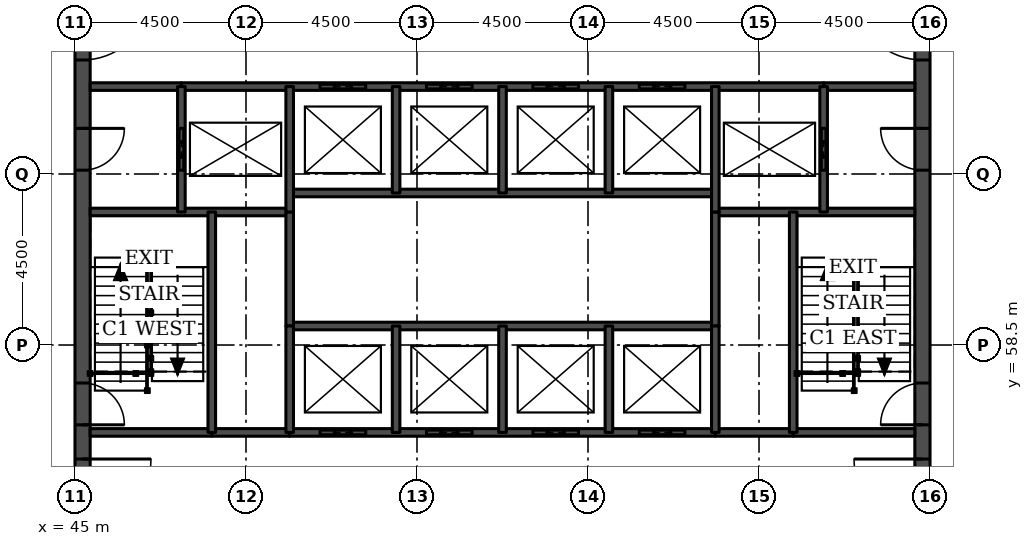
"""IFC4 building model, lengths in metres.
Left out: names, types, materials, properties, quantities, classifications, styles, units other than length and angle.
Written with IfcOpenShell. Run it as: python <this file> out.ifc"""

import sys

from ifc_helpers import new_model, si_unit, direction, frame, frame_2d, origin, place, context, subcontext, project, spatial, rectangle, extrude, element, fill, save


model = new_model("IFC4")
c1 = context("Model", 3, precision=1e-05, world=origin(), true_north=direction((0.0, 1.0)))
c2 = subcontext(c1, "Body", "Model", "MODEL_VIEW")
j1 = project(units=[si_unit("LENGTHUNIT", "METRE"), si_unit("PLANEANGLEUNIT", "RADIAN")], contexts=[c1])
p1 = place(None, origin())
s1 = spatial("IfcSite", under=j1, at=p1, CompositionType="ELEMENT")
p2 = place(p1, origin())
s2 = spatial("IfcBuilding", under=s1, at=p2, CompositionType="ELEMENT")
p3 = place(p2, frame((0.0, 0.0, 252.6)))
s3 = spatial("IfcBuildingStorey", under=s2, at=p3, CompositionType="ELEMENT", Elevation=252.6)
p4 = place(p3, frame((45.2, 49.5, 0.0), z_axis=(0.0, 0.0, 1.0), x_axis=(0.0, 1.0, 0.0)))
e1 = element("IfcWall", 1, at=p4, inside=s3, PredefinedType="SHEAR", context=c2, shape_type="SweptSolid", body=[
    extrude(rectangle(XDim=22.5, YDim=0.4, at=frame_2d((11.25, 0.0))), origin(), (0.0, 0.0, 1.0), 3.7),
])
p5 = place(p4, frame((4.2, 0.0, 0.0)))
e2 = element("IfcOpeningElement", 2, at=p5, cuts=e1, PredefinedType="OPENING", context=c2, shape_type="SweptSolid", body=[
    extrude(rectangle(XDim=1.8, YDim=2.1, at=frame_2d((0.9, 1.05))), frame((0.0, 0.21, 0.0), z_axis=(0.0, -1.0, 0.0), x_axis=(1.0, 0.0, 0.0)), (0.0, 0.0, 1.0), 0.42),
])
p6 = place(p4, frame((6.9, 0.0, 0.0)))
e3 = element("IfcOpeningElement", 3, at=p6, cuts=e1, PredefinedType="OPENING", context=c2, shape_type="SweptSolid", body=[
    extrude(rectangle(XDim=1.1, YDim=2.1, at=frame_2d((0.55, 1.05))), frame((0.0, 0.21, 0.0), z_axis=(0.0, -1.0, 0.0), x_axis=(1.0, 0.0, 0.0)), (0.0, 0.0, 1.0), 0.42),
])
p7 = place(p4, frame((13.6, 0.0, 0.0)))
e4 = element("IfcOpeningElement", 4, at=p7, cuts=e1, PredefinedType="OPENING", context=c2, shape_type="SweptSolid", body=[
    extrude(rectangle(XDim=1.1, YDim=2.1, at=frame_2d((0.55, 1.05))), frame((0.0, 0.21, 0.0), z_axis=(0.0, -1.0, 0.0), x_axis=(1.0, 0.0, 0.0)), (0.0, 0.0, 1.0), 0.42),
])
p8 = place(p4, frame((16.5, 0.0, 0.0)))
e5 = element("IfcOpeningElement", 5, at=p8, cuts=e1, PredefinedType="OPENING", context=c2, shape_type="SweptSolid", body=[
    extrude(rectangle(XDim=1.8, YDim=2.1, at=frame_2d((0.9, 1.05))), frame((0.0, 0.21, 0.0), z_axis=(0.0, -1.0, 0.0), x_axis=(1.0, 0.0, 0.0)), (0.0, 0.0, 1.0), 0.42),
])
p9 = place(p3, frame((67.3, 49.5, 0.0), z_axis=(0.0, 0.0, 1.0), x_axis=(0.0, 1.0, 0.0)))
e6 = element("IfcWall", 6, at=p9, inside=s3, PredefinedType="SHEAR", context=c2, shape_type="SweptSolid", body=[
    extrude(rectangle(XDim=22.5, YDim=0.4, at=frame_2d((11.25, 0.0))), origin(), (0.0, 0.0, 1.0), 3.7),
])
p10 = place(p9, frame((4.2, 0.0, 0.0)))
e7 = element("IfcOpeningElement", 7, at=p10, cuts=e6, PredefinedType="OPENING", context=c2, shape_type="SweptSolid", body=[
    extrude(rectangle(XDim=1.8, YDim=2.1, at=frame_2d((0.9, 1.05))), frame((0.0, 0.21, 0.0), z_axis=(0.0, -1.0, 0.0), x_axis=(1.0, 0.0, 0.0)), (0.0, 0.0, 1.0), 0.42),
])
p11 = place(p9, frame((6.9, 0.0, 0.0)))
e8 = element("IfcOpeningElement", 8, at=p11, cuts=e6, PredefinedType="OPENING", context=c2, shape_type="SweptSolid", body=[
    extrude(rectangle(XDim=1.1, YDim=2.1, at=frame_2d((0.55, 1.05))), frame((0.0, 0.21, 0.0), z_axis=(0.0, -1.0, 0.0), x_axis=(1.0, 0.0, 0.0)), (0.0, 0.0, 1.0), 0.42),
])
p12 = place(p9, frame((13.6, 0.0, 0.0)))
e9 = element("IfcOpeningElement", 9, at=p12, cuts=e6, PredefinedType="OPENING", context=c2, shape_type="SweptSolid", body=[
    extrude(rectangle(XDim=1.1, YDim=2.1, at=frame_2d((0.55, 1.05))), frame((0.0, 0.21, 0.0), z_axis=(0.0, -1.0, 0.0), x_axis=(1.0, 0.0, 0.0)), (0.0, 0.0, 1.0), 0.42),
])
p13 = place(p9, frame((16.5, 0.0, 0.0)))
e10 = element("IfcOpeningElement", 10, at=p13, cuts=e6, PredefinedType="OPENING", context=c2, shape_type="SweptSolid", body=[
    extrude(rectangle(XDim=1.8, YDim=2.1, at=frame_2d((0.9, 1.05))), frame((0.0, 0.21, 0.0), z_axis=(0.0, -1.0, 0.0), x_axis=(1.0, 0.0, 0.0)), (0.0, 0.0, 1.0), 0.42),
])
for number, where, z_axis, x_axis in (
    (11, (48.6, 56.2, 0.0), (0.0, 0.0, 1.0), (1.0, 0.0, 0.0)),
    (12, (61.85, 56.2, 0.0), (0.0, 0.0, 1.0), (1.0, 0.0, 0.0)),
):
    element("IfcWall", number, at=place(p3, frame(where, z_axis=z_axis, x_axis=x_axis)), inside=s3, PredefinedType="SOLIDWALL", context=c2, shape_type="SweptSolid", body=[
        extrude(rectangle(XDim=2.05, YDim=0.2, at=frame_2d((1.025, 0.0))), origin(), (0.0, 0.0, 1.0), 3.55),
    ])
p14 = place(p3, frame((45.4, 56.2, 0.0), z_axis=(0.0, 0.0, 1.0), x_axis=(1.0, 0.0, 0.0)))
e13 = element("IfcWall", 13, at=p14, inside=s3, PredefinedType="SOLIDWALL", context=c2, shape_type="SweptSolid", body=[
    extrude(rectangle(XDim=3.2, YDim=0.2, at=frame_2d((1.6, 0.0))), origin(), (0.0, 0.0, 1.0), 3.55),
])
p15 = place(p3, frame((50.65, 56.2, 0.0), z_axis=(0.0, 0.0, 1.0), x_axis=(1.0, 0.0, 0.0)))
e14 = element("IfcWall", 14, at=p15, inside=s3, PredefinedType="SOLIDWALL", context=c2, shape_type="SweptSolid", body=[
    extrude(rectangle(XDim=11.2, YDim=0.2, at=frame_2d((5.6, 0.0))), origin(), (0.0, 0.0, 1.0), 3.55),
])
p16 = place(p15, frame((0.8, 0.0, 0.0)))
e15 = element("IfcOpeningElement", 15, at=p16, cuts=e14, PredefinedType="OPENING", context=c2, shape_type="SweptSolid", body=[
    extrude(rectangle(XDim=1.2, YDim=2.1, at=frame_2d((0.6, 1.05))), frame((0.0, 0.11, 0.0), z_axis=(0.0, -1.0, 0.0), x_axis=(1.0, 0.0, 0.0)), (0.0, 0.0, 1.0), 0.22),
])
p17 = place(p15, frame((3.6, 0.0, 0.0)))
e16 = element("IfcOpeningElement", 16, at=p17, cuts=e14, PredefinedType="OPENING", context=c2, shape_type="SweptSolid", body=[
    extrude(rectangle(XDim=1.2, YDim=2.1, at=frame_2d((0.6, 1.05))), frame((0.0, 0.11, 0.0), z_axis=(0.0, -1.0, 0.0), x_axis=(1.0, 0.0, 0.0)), (0.0, 0.0, 1.0), 0.22),
])
p18 = place(p15, frame((6.4, 0.0, 0.0)))
e17 = element("IfcOpeningElement", 17, at=p18, cuts=e14, PredefinedType="OPENING", context=c2, shape_type="SweptSolid", body=[
    extrude(rectangle(XDim=1.2, YDim=2.1, at=frame_2d((0.6, 1.05))), frame((0.0, 0.11, 0.0), z_axis=(0.0, -1.0, 0.0), x_axis=(1.0, 0.0, 0.0)), (0.0, 0.0, 1.0), 0.22),
])
p19 = place(p15, frame((9.2, 0.0, 0.0)))
e18 = element("IfcOpeningElement", 18, at=p19, cuts=e14, PredefinedType="OPENING", context=c2, shape_type="SweptSolid", body=[
    extrude(rectangle(XDim=1.2, YDim=2.1, at=frame_2d((0.6, 1.05))), frame((0.0, 0.11, 0.0), z_axis=(0.0, -1.0, 0.0), x_axis=(1.0, 0.0, 0.0)), (0.0, 0.0, 1.0), 0.22),
])
p20 = place(p3, frame((63.9, 56.2, 0.0), z_axis=(0.0, 0.0, 1.0), x_axis=(1.0, 0.0, 0.0)))
e19 = element("IfcWall", 19, at=p20, inside=s3, PredefinedType="SOLIDWALL", context=c2, shape_type="SweptSolid", body=[
    extrude(rectangle(XDim=3.2, YDim=0.2, at=frame_2d((1.6, 0.0))), origin(), (0.0, 0.0, 1.0), 3.55),
])
p21 = place(p3, frame((50.65, 59.0, 0.0), z_axis=(0.0, 0.0, 1.0), x_axis=(1.0, 0.0, 0.0)))
e20 = element("IfcWall", 20, at=p21, inside=s3, PredefinedType="SOLIDWALL", context=c2, shape_type="SweptSolid", body=[
    extrude(rectangle(XDim=11.2, YDim=0.2, at=frame_2d((5.6, 0.0))), origin(), (0.0, 0.0, 1.0), 3.7),
])
for number, where, z_axis, x_axis in (
    (21, (45.4, 62.0, 0.0), (0.0, 0.0, 1.0), (1.0, 0.0, 0.0)),
    (22, (61.85, 62.0, 0.0), (0.0, 0.0, 1.0), (1.0, 0.0, 0.0)),
):
    element("IfcWall", number, at=place(p3, frame(where, z_axis=z_axis, x_axis=x_axis)), inside=s3, PredefinedType="SOLIDWALL", context=c2, shape_type="SweptSolid", body=[
        extrude(rectangle(XDim=5.25, YDim=0.2, at=frame_2d((2.625, 0.0))), origin(), (0.0, 0.0, 1.0), 3.55),
    ])
p22 = place(p3, frame((50.65, 62.5, 0.0), z_axis=(0.0, 0.0, 1.0), x_axis=(1.0, 0.0, 0.0)))
e23 = element("IfcWall", 23, at=p22, inside=s3, PredefinedType="SOLIDWALL", context=c2, shape_type="SweptSolid", body=[
    extrude(rectangle(XDim=11.2, YDim=0.2, at=frame_2d((5.6, 0.0))), origin(), (0.0, 0.0, 1.0), 3.7),
])
for number, where, z_axis, x_axis in (
    (24, (45.4, 65.3, 0.0), (0.0, 0.0, 1.0), (1.0, 0.0, 0.0)),
    (25, (64.7, 65.3, 0.0), (0.0, 0.0, 1.0), (1.0, 0.0, 0.0)),
):
    element("IfcWall", number, at=place(p3, frame(where, z_axis=z_axis, x_axis=x_axis)), inside=s3, PredefinedType="SOLIDWALL", context=c2, shape_type="SweptSolid", body=[
        extrude(rectangle(XDim=2.4, YDim=0.2, at=frame_2d((1.2, 0.0))), origin(), (0.0, 0.0, 1.0), 3.55),
    ])
p23 = place(p3, frame((47.8, 65.3, 0.0), z_axis=(0.0, 0.0, 1.0), x_axis=(1.0, 0.0, 0.0)))
e26 = element("IfcWall", 26, at=p23, inside=s3, PredefinedType="SOLIDWALL", context=c2, shape_type="SweptSolid", body=[
    extrude(rectangle(XDim=16.9, YDim=0.2, at=frame_2d((8.45, 0.0))), origin(), (0.0, 0.0, 1.0), 3.55),
])
p24 = place(p23, frame((3.65, 0.0, 0.0)))
e27 = element("IfcOpeningElement", 27, at=p24, cuts=e26, PredefinedType="OPENING", context=c2, shape_type="SweptSolid", body=[
    extrude(rectangle(XDim=1.2, YDim=2.1, at=frame_2d((0.6, 1.05))), frame((0.0, 0.11, 0.0), z_axis=(0.0, -1.0, 0.0), x_axis=(1.0, 0.0, 0.0)), (0.0, 0.0, 1.0), 0.22),
])
p25 = place(p23, frame((6.45, 0.0, 0.0)))
e28 = element("IfcOpeningElement", 28, at=p25, cuts=e26, PredefinedType="OPENING", context=c2, shape_type="SweptSolid", body=[
    extrude(rectangle(XDim=1.2, YDim=2.1, at=frame_2d((0.6, 1.05))), frame((0.0, 0.11, 0.0), z_axis=(0.0, -1.0, 0.0), x_axis=(1.0, 0.0, 0.0)), (0.0, 0.0, 1.0), 0.22),
])
p26 = place(p23, frame((9.25, 0.0, 0.0)))
e29 = element("IfcOpeningElement", 29, at=p26, cuts=e26, PredefinedType="OPENING", context=c2, shape_type="SweptSolid", body=[
    extrude(rectangle(XDim=1.2, YDim=2.1, at=frame_2d((0.6, 1.05))), frame((0.0, 0.11, 0.0), z_axis=(0.0, -1.0, 0.0), x_axis=(1.0, 0.0, 0.0)), (0.0, 0.0, 1.0), 0.22),
])
p27 = place(p23, frame((12.05, 0.0, 0.0)))
e30 = element("IfcOpeningElement", 30, at=p27, cuts=e26, PredefinedType="OPENING", context=c2, shape_type="SweptSolid", body=[
    extrude(rectangle(XDim=1.2, YDim=2.1, at=frame_2d((0.6, 1.05))), frame((0.0, 0.11, 0.0), z_axis=(0.0, -1.0, 0.0), x_axis=(1.0, 0.0, 0.0)), (0.0, 0.0, 1.0), 0.22),
])
p28 = place(p3, frame((47.8, 62.0, 0.0), z_axis=(0.0, 0.0, 1.0), x_axis=(0.0, 1.0, 0.0)))
e31 = element("IfcWall", 31, at=p28, inside=s3, PredefinedType="SOLIDWALL", context=c2, shape_type="SweptSolid", body=[
    extrude(rectangle(XDim=3.3, YDim=0.2, at=frame_2d((1.65, 0.0))), origin(), (0.0, 0.0, 1.0), 3.55),
])
p29 = place(p28, frame((1.1, 0.0, 0.0)))
e32 = element("IfcOpeningElement", 32, at=p29, cuts=e31, PredefinedType="OPENING", context=c2, shape_type="SweptSolid", body=[
    extrude(rectangle(XDim=1.1, YDim=2.1, at=frame_2d((0.55, 1.05))), frame((0.0, 0.11, 0.0), z_axis=(0.0, -1.0, 0.0), x_axis=(1.0, 0.0, 0.0)), (0.0, 0.0, 1.0), 0.22),
])
p30 = place(p3, frame((48.6, 56.2, 0.0), z_axis=(0.0, 0.0, 1.0), x_axis=(0.0, 1.0, 0.0)))
e33 = element("IfcWall", 33, at=p30, inside=s3, PredefinedType="SOLIDWALL", context=c2, shape_type="SweptSolid", body=[
    extrude(rectangle(XDim=5.8, YDim=0.2, at=frame_2d((2.9, 0.0))), origin(), (0.0, 0.0, 1.0), 3.55),
])
p31 = place(p3, frame((50.65, 59.0, 0.0), z_axis=(0.0, 0.0, 1.0), x_axis=(0.0, 1.0, 0.0)))
e34 = element("IfcWall", 34, at=p31, inside=s3, PredefinedType="SOLIDWALL", context=c2, shape_type="SweptSolid", body=[
    extrude(rectangle(XDim=3.0, YDim=0.2, at=frame_2d((1.5, 0.0))), origin(), (0.0, 0.0, 1.0), 3.7),
])
p32 = place(p3, frame((50.65, 56.2, 0.0), z_axis=(0.0, 0.0, 1.0), x_axis=(0.0, 1.0, 0.0)))
e35 = element("IfcWall", 35, at=p32, inside=s3, PredefinedType="SOLIDWALL", context=c2, shape_type="SweptSolid", body=[
    extrude(rectangle(XDim=2.8, YDim=0.2, at=frame_2d((1.4, 0.0))), origin(), (0.0, 0.0, 1.0), 3.55),
])
p33 = place(p3, frame((50.65, 62.0, 0.0), z_axis=(0.0, 0.0, 1.0), x_axis=(0.0, 1.0, 0.0)))
e36 = element("IfcWall", 36, at=p33, inside=s3, PredefinedType="SOLIDWALL", context=c2, shape_type="SweptSolid", body=[
    extrude(rectangle(XDim=3.3, YDim=0.2, at=frame_2d((1.65, 0.0))), origin(), (0.0, 0.0, 1.0), 3.55),
])
for number, where, z_axis, x_axis in (
    (37, (53.45, 56.2, 0.0), (0.0, 0.0, 1.0), (0.0, 1.0, 0.0)),
    (38, (53.45, 62.5, 0.0), (0.0, 0.0, 1.0), (0.0, 1.0, 0.0)),
    (39, (56.25, 56.2, 0.0), (0.0, 0.0, 1.0), (0.0, 1.0, 0.0)),
    (40, (56.25, 62.5, 0.0), (0.0, 0.0, 1.0), (0.0, 1.0, 0.0)),
    (41, (59.05, 56.2, 0.0), (0.0, 0.0, 1.0), (0.0, 1.0, 0.0)),
    (42, (59.05, 62.5, 0.0), (0.0, 0.0, 1.0), (0.0, 1.0, 0.0)),
):
    element("IfcWall", number, at=place(p3, frame(where, z_axis=z_axis, x_axis=x_axis)), inside=s3, PredefinedType="SOLIDWALL", context=c2, shape_type="SweptSolid", body=[
        extrude(rectangle(XDim=2.8, YDim=0.2, at=frame_2d((1.4, 0.0))), origin(), (0.0, 0.0, 1.0), 3.55),
    ])
p34 = place(p3, frame((61.85, 59.0, 0.0), z_axis=(0.0, 0.0, 1.0), x_axis=(0.0, 1.0, 0.0)))
e43 = element("IfcWall", 43, at=p34, inside=s3, PredefinedType="SOLIDWALL", context=c2, shape_type="SweptSolid", body=[
    extrude(rectangle(XDim=3.0, YDim=0.2, at=frame_2d((1.5, 0.0))), origin(), (0.0, 0.0, 1.0), 3.7),
])
p35 = place(p3, frame((61.85, 56.2, 0.0), z_axis=(0.0, 0.0, 1.0), x_axis=(0.0, 1.0, 0.0)))
e44 = element("IfcWall", 44, at=p35, inside=s3, PredefinedType="SOLIDWALL", context=c2, shape_type="SweptSolid", body=[
    extrude(rectangle(XDim=2.8, YDim=0.2, at=frame_2d((1.4, 0.0))), origin(), (0.0, 0.0, 1.0), 3.55),
])
p36 = place(p3, frame((61.85, 62.0, 0.0), z_axis=(0.0, 0.0, 1.0), x_axis=(0.0, 1.0, 0.0)))
e45 = element("IfcWall", 45, at=p36, inside=s3, PredefinedType="SOLIDWALL", context=c2, shape_type="SweptSolid", body=[
    extrude(rectangle(XDim=3.3, YDim=0.2, at=frame_2d((1.65, 0.0))), origin(), (0.0, 0.0, 1.0), 3.55),
])
p37 = place(p3, frame((63.9, 56.2, 0.0), z_axis=(0.0, 0.0, 1.0), x_axis=(0.0, 1.0, 0.0)))
e46 = element("IfcWall", 46, at=p37, inside=s3, PredefinedType="SOLIDWALL", context=c2, shape_type="SweptSolid", body=[
    extrude(rectangle(XDim=5.8, YDim=0.2, at=frame_2d((2.9, 0.0))), origin(), (0.0, 0.0, 1.0), 3.55),
])
p38 = place(p3, frame((64.7, 62.0, 0.0), z_axis=(0.0, 0.0, 1.0), x_axis=(0.0, 1.0, 0.0)))
e47 = element("IfcWall", 47, at=p38, inside=s3, PredefinedType="SOLIDWALL", context=c2, shape_type="SweptSolid", body=[
    extrude(rectangle(XDim=3.3, YDim=0.2, at=frame_2d((1.65, 0.0))), origin(), (0.0, 0.0, 1.0), 3.55),
])
p39 = place(p38, frame((1.1, 0.0, 0.0)))
e48 = element("IfcOpeningElement", 48, at=p39, cuts=e47, PredefinedType="OPENING", context=c2, shape_type="SweptSolid", body=[
    extrude(rectangle(XDim=1.1, YDim=2.1, at=frame_2d((0.55, 1.05))), frame((0.0, 0.11, 0.0), z_axis=(0.0, -1.0, 0.0), x_axis=(1.0, 0.0, 0.0)), (0.0, 0.0, 1.0), 0.22),
])
p40 = place(p16, origin())
e49 = element("IfcDoor", 49, at=p40, inside=s3, OperationType="DOUBLE_DOOR_SLIDING", PredefinedType="DOOR", context=c2, shape_type="SweptSolid", body=[
    extrude(rectangle(XDim=1.2, YDim=2.1, at=frame_2d((0.6, 1.05))), frame((0.0, 0.025, 0.0), z_axis=(0.0, -1.0, 0.0), x_axis=(1.0, 0.0, 0.0)), (0.0, 0.0, 1.0), 0.05),
])
fill(e15, e49)
p41 = place(p17, origin())
e50 = element("IfcDoor", 50, at=p41, inside=s3, OperationType="DOUBLE_DOOR_SLIDING", PredefinedType="DOOR", context=c2, shape_type="SweptSolid", body=[
    extrude(rectangle(XDim=1.2, YDim=2.1, at=frame_2d((0.6, 1.05))), frame((0.0, 0.025, 0.0), z_axis=(0.0, -1.0, 0.0), x_axis=(1.0, 0.0, 0.0)), (0.0, 0.0, 1.0), 0.05),
])
fill(e16, e50)
p42 = place(p18, origin())
e51 = element("IfcDoor", 51, at=p42, inside=s3, OperationType="DOUBLE_DOOR_SLIDING", PredefinedType="DOOR", context=c2, shape_type="SweptSolid", body=[
    extrude(rectangle(XDim=1.2, YDim=2.1, at=frame_2d((0.6, 1.05))), frame((0.0, 0.025, 0.0), z_axis=(0.0, -1.0, 0.0), x_axis=(1.0, 0.0, 0.0)), (0.0, 0.0, 1.0), 0.05),
])
fill(e17, e51)
p43 = place(p19, origin())
e52 = element("IfcDoor", 52, at=p43, inside=s3, OperationType="DOUBLE_DOOR_SLIDING", PredefinedType="DOOR", context=c2, shape_type="SweptSolid", body=[
    extrude(rectangle(XDim=1.2, YDim=2.1, at=frame_2d((0.6, 1.05))), frame((0.0, 0.025, 0.0), z_axis=(0.0, -1.0, 0.0), x_axis=(1.0, 0.0, 0.0)), (0.0, 0.0, 1.0), 0.05),
])
fill(e18, e52)
p44 = place(p24, origin())
e53 = element("IfcDoor", 53, at=p44, inside=s3, OperationType="DOUBLE_DOOR_SLIDING", PredefinedType="DOOR", context=c2, shape_type="SweptSolid", body=[
    extrude(rectangle(XDim=1.2, YDim=2.1, at=frame_2d((0.6, 1.05))), frame((0.0, 0.025, 0.0), z_axis=(0.0, -1.0, 0.0), x_axis=(1.0, 0.0, 0.0)), (0.0, 0.0, 1.0), 0.05),
])
fill(e27, e53)
p45 = place(p25, origin())
e54 = element("IfcDoor", 54, at=p45, inside=s3, OperationType="DOUBLE_DOOR_SLIDING", PredefinedType="DOOR", context=c2, shape_type="SweptSolid", body=[
    extrude(rectangle(XDim=1.2, YDim=2.1, at=frame_2d((0.6, 1.05))), frame((0.0, 0.025, 0.0), z_axis=(0.0, -1.0, 0.0), x_axis=(1.0, 0.0, 0.0)), (0.0, 0.0, 1.0), 0.05),
])
fill(e28, e54)
p46 = place(p26, origin())
e55 = element("IfcDoor", 55, at=p46, inside=s3, OperationType="DOUBLE_DOOR_SLIDING", PredefinedType="DOOR", context=c2, shape_type="SweptSolid", body=[
    extrude(rectangle(XDim=1.2, YDim=2.1, at=frame_2d((0.6, 1.05))), frame((0.0, 0.025, 0.0), z_axis=(0.0, -1.0, 0.0), x_axis=(1.0, 0.0, 0.0)), (0.0, 0.0, 1.0), 0.05),
])
fill(e29, e55)
p47 = place(p27, origin())
e56 = element("IfcDoor", 56, at=p47, inside=s3, OperationType="DOUBLE_DOOR_SLIDING", PredefinedType="DOOR", context=c2, shape_type="SweptSolid", body=[
    extrude(rectangle(XDim=1.2, YDim=2.1, at=frame_2d((0.6, 1.05))), frame((0.0, 0.025, 0.0), z_axis=(0.0, -1.0, 0.0), x_axis=(1.0, 0.0, 0.0)), (0.0, 0.0, 1.0), 0.05),
])
fill(e30, e56)
p48 = place(p29, origin())
e57 = element("IfcDoor", 57, at=p48, inside=s3, OperationType="DOUBLE_DOOR_SLIDING", PredefinedType="DOOR", context=c2, shape_type="SweptSolid", body=[
    extrude(rectangle(XDim=1.1, YDim=2.1, at=frame_2d((0.55, 1.05))), frame((0.0, 0.025, 0.0), z_axis=(0.0, -1.0, 0.0), x_axis=(1.0, 0.0, 0.0)), (0.0, 0.0, 1.0), 0.05),
])
fill(e32, e57)
p49 = place(p39, origin())
e58 = element("IfcDoor", 58, at=p49, inside=s3, OperationType="DOUBLE_DOOR_SLIDING", PredefinedType="DOOR", context=c2, shape_type="SweptSolid", body=[
    extrude(rectangle(XDim=1.1, YDim=2.1, at=frame_2d((0.55, 1.05))), frame((0.0, 0.025, 0.0), z_axis=(0.0, -1.0, 0.0), x_axis=(1.0, 0.0, 0.0)), (0.0, 0.0, 1.0), 0.05),
])
fill(e48, e58)
p50 = place(p5, frame((1.8, 0.0, 0.0), z_axis=(0.0, 0.0, 1.0), x_axis=(-1.0, 0.0, 0.0)))
e59 = element("IfcDoor", 59, at=p50, inside=s3, OperationType="SINGLE_SWING_LEFT", PredefinedType="DOOR", context=c2, shape_type="SweptSolid", body=[
    extrude(rectangle(XDim=1.8, YDim=2.1, at=frame_2d((0.9, 1.05))), frame((0.0, 0.025, 0.0), z_axis=(0.0, -1.0, 0.0), x_axis=(1.0, 0.0, 0.0)), (0.0, 0.0, 1.0), 0.05),
])
fill(e2, e59)
p51 = place(p6, frame((1.1, 0.0, 0.0), z_axis=(0.0, 0.0, 1.0), x_axis=(-1.0, 0.0, 0.0)))
e60 = element("IfcDoor", 60, at=p51, inside=s3, OperationType="SINGLE_SWING_RIGHT", PredefinedType="DOOR", context=c2, shape_type="SweptSolid", body=[
    extrude(rectangle(XDim=1.1, YDim=2.1, at=frame_2d((0.55, 1.05))), frame((0.0, 0.025, 0.0), z_axis=(0.0, -1.0, 0.0), x_axis=(1.0, 0.0, 0.0)), (0.0, 0.0, 1.0), 0.05),
])
fill(e3, e60)
p52 = place(p7, frame((1.1, 0.0, 0.0), z_axis=(0.0, 0.0, 1.0), x_axis=(-1.0, 0.0, 0.0)))
e61 = element("IfcDoor", 61, at=p52, inside=s3, OperationType="SINGLE_SWING_LEFT", PredefinedType="DOOR", context=c2, shape_type="SweptSolid", body=[
    extrude(rectangle(XDim=1.1, YDim=2.1, at=frame_2d((0.55, 1.05))), frame((0.0, 0.025, 0.0), z_axis=(0.0, -1.0, 0.0), x_axis=(1.0, 0.0, 0.0)), (0.0, 0.0, 1.0), 0.05),
])
fill(e4, e61)
p53 = place(p8, frame((1.8, 0.0, 0.0), z_axis=(0.0, 0.0, 1.0), x_axis=(-1.0, 0.0, 0.0)))
e62 = element("IfcDoor", 62, at=p53, inside=s3, OperationType="SINGLE_SWING_LEFT", PredefinedType="DOOR", context=c2, shape_type="SweptSolid", body=[
    extrude(rectangle(XDim=1.8, YDim=2.1, at=frame_2d((0.9, 1.05))), frame((0.0, 0.025, 0.0), z_axis=(0.0, -1.0, 0.0), x_axis=(1.0, 0.0, 0.0)), (0.0, 0.0, 1.0), 0.05),
])
fill(e5, e62)
p54 = place(p10, origin())
e63 = element("IfcDoor", 63, at=p54, inside=s3, OperationType="SINGLE_SWING_RIGHT", PredefinedType="DOOR", context=c2, shape_type="SweptSolid", body=[
    extrude(rectangle(XDim=1.8, YDim=2.1, at=frame_2d((0.9, 1.05))), frame((0.0, 0.025, 0.0), z_axis=(0.0, -1.0, 0.0), x_axis=(1.0, 0.0, 0.0)), (0.0, 0.0, 1.0), 0.05),
])
fill(e7, e63)
p55 = place(p11, origin())
e64 = element("IfcDoor", 64, at=p55, inside=s3, OperationType="SINGLE_SWING_LEFT", PredefinedType="DOOR", context=c2, shape_type="SweptSolid", body=[
    extrude(rectangle(XDim=1.1, YDim=2.1, at=frame_2d((0.55, 1.05))), frame((0.0, 0.025, 0.0), z_axis=(0.0, -1.0, 0.0), x_axis=(1.0, 0.0, 0.0)), (0.0, 0.0, 1.0), 0.05),
])
fill(e8, e64)
p56 = place(p12, origin())
e65 = element("IfcDoor", 65, at=p56, inside=s3, OperationType="SINGLE_SWING_RIGHT", PredefinedType="DOOR", context=c2, shape_type="SweptSolid", body=[
    extrude(rectangle(XDim=1.1, YDim=2.1, at=frame_2d((0.55, 1.05))), frame((0.0, 0.025, 0.0), z_axis=(0.0, -1.0, 0.0), x_axis=(1.0, 0.0, 0.0)), (0.0, 0.0, 1.0), 0.05),
])
fill(e9, e65)
p57 = place(p13, origin())
e66 = element("IfcDoor", 66, at=p57, inside=s3, OperationType="SINGLE_SWING_RIGHT", PredefinedType="DOOR", context=c2, shape_type="SweptSolid", body=[
    extrude(rectangle(XDim=1.8, YDim=2.1, at=frame_2d((0.9, 1.05))), frame((0.0, 0.025, 0.0), z_axis=(0.0, -1.0, 0.0), x_axis=(1.0, 0.0, 0.0)), (0.0, 0.0, 1.0), 0.05),
])
fill(e10, e66)
save(model, sys.argv[1])
